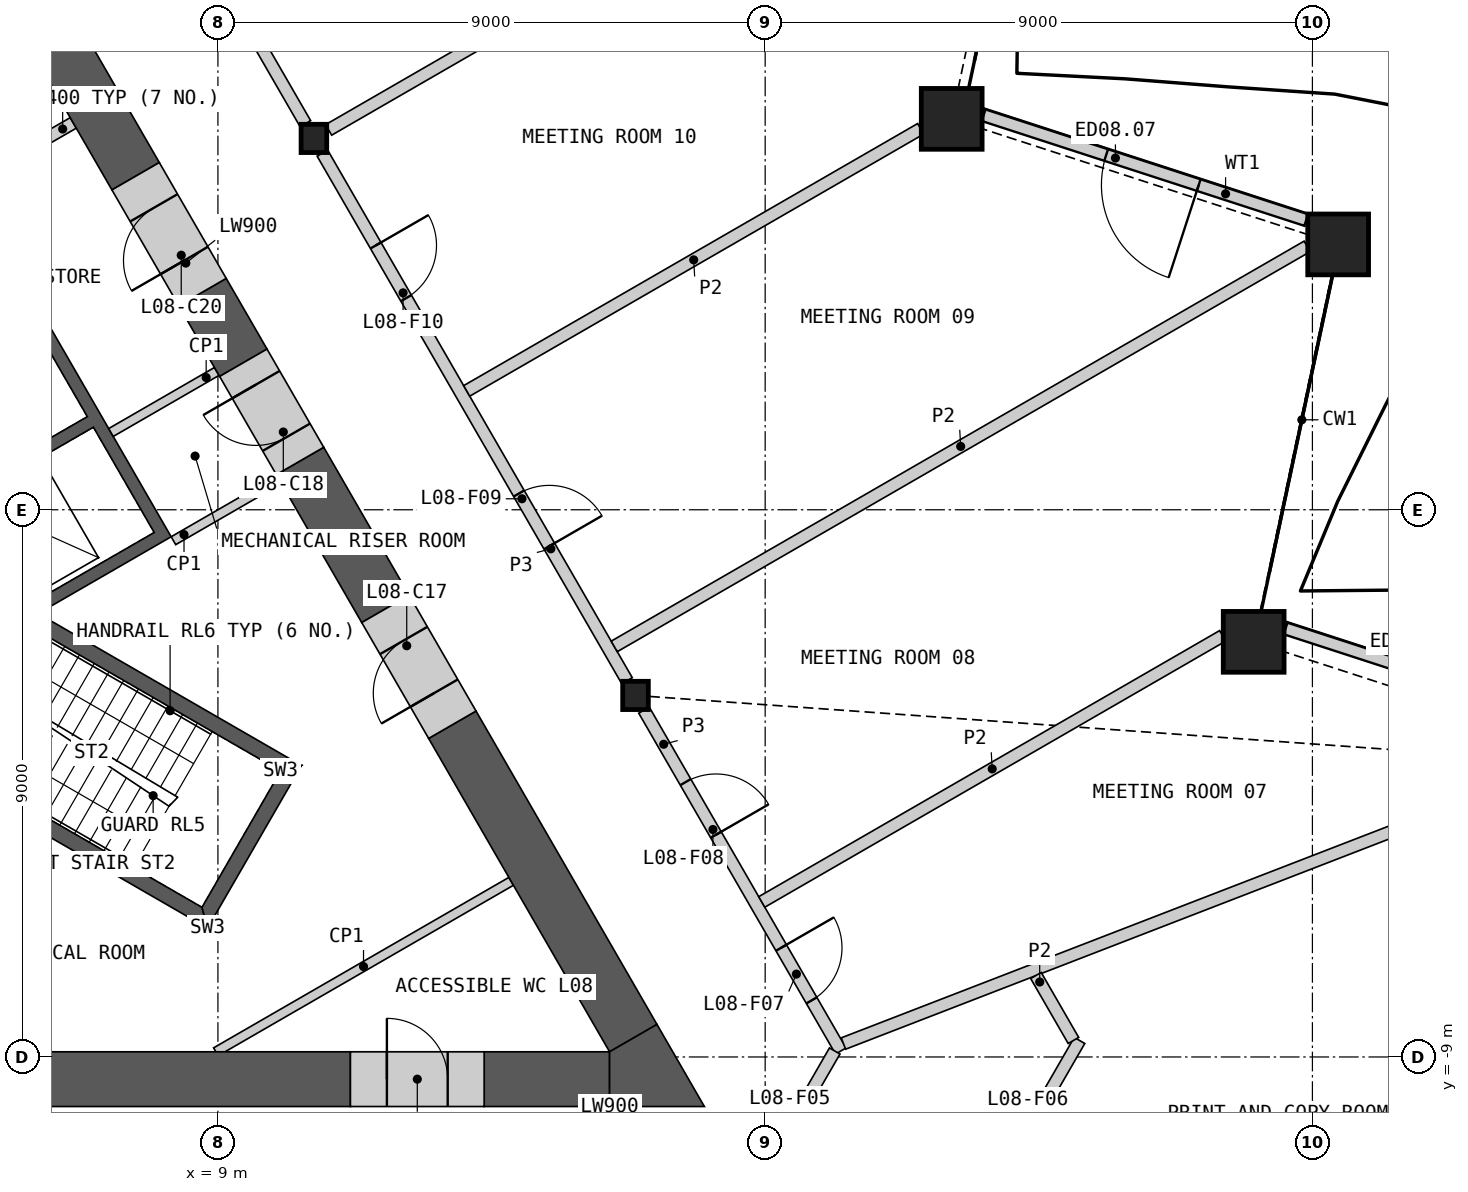
"""IFC4 building model, lengths in metres.
Left out: names, types, materials, properties, quantities, classifications, styles, units other than length and angle.
Written with IfcOpenShell. Run it as: python <this file> out.ifc"""

import sys

from ifc_helpers import new_model, si_unit, direction, frame, frame_2d, origin, origin_2d, place, context, subcontext, project, spatial, polyline, rectangle, hollow_rectangle, i_section, outline, extrude, element, fill, save


model = new_model("IFC4")
c1 = context("Model", 3, precision=1e-05, world=origin(), true_north=direction((0.0, 1.0)))
c2 = subcontext(c1, "Body", "Model", "MODEL_VIEW")
j1 = project(units=[si_unit("LENGTHUNIT", "METRE"), si_unit("PLANEANGLEUNIT", "RADIAN")], contexts=[c1])
p1 = place(None, origin())
s1 = spatial("IfcSite", under=j1, at=p1, CompositionType="ELEMENT")
p2 = place(p1, origin())
s2 = spatial("IfcBuilding", under=s1, at=p2, CompositionType="ELEMENT")
p3 = place(p2, frame((0.0, 0.0, 42.6)))
s3 = spatial("IfcBuildingStorey", under=s2, at=p3, CompositionType="ELEMENT", Elevation=42.6)
for number, where, z_axis, x_axis in (
    (1, (26.034, -2.172, 0.0), (0.0, 0.0, 1.0), (1.0, 0.0, 0.0)),
    (2, (27.423, 4.364, 0.0), (0.0, 0.0, 1.0), (1.0, 0.0, 0.0)),
    (3, (21.068, 6.429, 0.0), (0.0, 0.0, 1.0), (1.0, 0.0, 0.0)),
):
    element("IfcColumn", number, at=place(p3, frame(where, z_axis=z_axis, x_axis=x_axis)), inside=s3, PredefinedType="COLUMN", context=c2, shape_type="SweptSolid", body=[
        extrude(hollow_rectangle(XDim=1.0, YDim=1.0, WallThickness=0.07, at=origin_2d()), origin(), (0.0, 0.0, 1.0), 4.2),
    ])
for number, where, z_axis, x_axis in (
    (4, (15.868, -3.054, 0.0), (0.0, 0.0, 1.0), (1.0, 0.0, 0.0)),
    (5, (10.578, 6.107, 0.0), (0.0, 0.0, 1.0), (1.0, 0.0, 0.0)),
):
    element("IfcColumn", number, at=place(p3, frame(where, z_axis=z_axis, x_axis=x_axis)), inside=s3, PredefinedType="COLUMN", context=c2, shape_type="SweptSolid", body=[
        extrude(i_section(OverallWidth=0.421, OverallDepth=0.465, WebThickness=0.045, FlangeThickness=0.072, at=origin_2d()), origin(), (0.0, 0.0, 1.0), 4.2),
    ])
p4 = place(p3, frame((31.914, -3.693, 0.0), z_axis=(0.0, 0.0, 1.0), x_axis=(-0.951049360908, 0.309039015525, 0.0)))
e6 = element("IfcWall", 6, at=p4, inside=s3, PredefinedType="SOLIDWALL", context=c2, shape_type="SweptSolid", body=[
    extrude(rectangle(XDim=5.631, YDim=0.2, at=frame_2d((2.815, 0.0))), origin(), (0.0, 0.0, 1.0), 3.189),
])
p5 = place(p4, frame((2.031, 0.0, 0.0)))
e7 = element("IfcOpeningElement", 7, at=p5, cuts=e6, PredefinedType="OPENING", context=c2, shape_type="SweptSolid", body=[
    extrude(rectangle(XDim=1.6, YDim=2.4, at=frame_2d((0.8, 1.2))), frame((0.0, 0.11, 0.0), z_axis=(0.0, -1.0, 0.0), x_axis=(1.0, 0.0, 0.0)), (0.0, 0.0, 1.0), 0.22),
])
p6 = place(p3, frame((26.899, 4.765, 0.0), z_axis=(0.0, 0.0, 1.0), x_axis=(-0.951054004345, 0.309024725255, 0.0)))
e8 = element("IfcWall", 8, at=p6, inside=s3, PredefinedType="SOLIDWALL", context=c2, shape_type="SweptSolid", body=[
    extrude(rectangle(XDim=5.579, YDim=0.2, at=frame_2d((2.79, 0.0))), origin(), (0.0, 0.0, 1.0), 3.189),
])
p7 = place(p6, frame((1.86, 0.0, 0.0)))
e9 = element("IfcOpeningElement", 9, at=p7, cuts=e8, PredefinedType="OPENING", context=c2, shape_type="SweptSolid", body=[
    extrude(rectangle(XDim=1.6, YDim=2.4, at=frame_2d((0.8, 1.2))), frame((0.0, 0.11, 0.0), z_axis=(0.0, -1.0, 0.0), x_axis=(1.0, 0.0, 0.0)), (0.0, 0.0, 1.0), 0.22),
])
p8 = place(p3, origin())
e10 = element("IfcWall", 10, at=p8, inside=s3, PredefinedType="SHEAR", context=c2, shape_type="SweptSolid", body=[
    extrude(outline(polyline([(2.66, 4.192), (4.831, 5.445), (8.231, -0.444), (6.061, -1.697), (5.96, -1.524), (7.952, -0.374), (6.952, 1.358), (4.96, 0.208), (4.861, 0.381), (6.852, 1.531), (5.852, 3.263), (3.861, 2.113), (3.76, 2.287), (5.752, 3.437), (4.752, 5.169), (2.76, 4.019), (2.66, 4.192)])), origin(), (0.0, 0.0, 1.0), 3.8),
])
p9 = place(p3, frame((4.881, 5.358, 0.0), z_axis=(0.0, 0.0, 1.0), x_axis=(0.866035824272, 0.499981950752, 0.0)))
e11 = element("IfcWall", 11, at=p9, inside=s3, PredefinedType="SHEAR", context=c2, shape_type="SweptSolid", body=[
    extrude(rectangle(XDim=2.009, YDim=0.2, at=frame_2d((1.004, 0.0))), origin(), (0.0, 0.0, 1.0), 3.8),
])
p10 = place(p3, origin())
e12 = element("IfcWall", 12, at=p10, inside=s3, PredefinedType="SHEAR", context=c2, shape_type="SweptSolid", body=[
    extrude(outline(polyline([(3.763, -3.956), (8.83, -6.881), (8.738, -6.539), (3.888, -3.739), (3.763, -3.956)])), origin(), (0.0, 0.0, 1.0), 3.8),
])
p11 = place(p3, origin())
e13 = element("IfcWall", 13, at=p11, inside=s3, PredefinedType="SHEAR", context=c2, shape_type="SweptSolid", body=[
    extrude(outline(polyline([(8.83, -6.881), (10.374, -4.206), (10.032, -4.298), (8.738, -6.539), (8.83, -6.881)])), origin(), (0.0, 0.0, 1.0), 3.8),
])
p12 = place(p3, origin())
e14 = element("IfcWall", 14, at=p12, inside=s3, PredefinedType="SHEAR", context=c2, shape_type="SweptSolid", body=[
    extrude(outline(polyline([(10.032, -4.298), (10.374, -4.206), (5.307, -1.281), (5.182, -1.498), (10.032, -4.298)])), origin(), (0.0, 0.0, 1.0), 3.8),
])
p13 = place(p3, frame((8.268, -0.509, 0.0), z_axis=(0.0, 0.0, 1.0), x_axis=(0.866035824272, 0.499981950752, 0.0)))
e15 = element("IfcWall", 15, at=p13, inside=s3, PredefinedType="PARTITIONING", context=c2, shape_type="SweptSolid", body=[
    extrude(rectangle(XDim=2.009, YDim=0.15, at=frame_2d((1.004, 0.0))), origin(), (0.0, 0.0, 1.0), 3.8),
])
p14 = place(p3, frame((13.823, -6.111, 0.0), z_axis=(0.0, 0.0, 1.0), x_axis=(-0.866026802741, -0.499997576928, 0.0)))
e16 = element("IfcWall", 16, at=p14, inside=s3, PredefinedType="PARTITIONING", context=c2, shape_type="SweptSolid", body=[
    extrude(rectangle(XDim=5.607, YDim=0.15, at=frame_2d((2.804, 0.0))), origin(), (0.0, 0.0, 1.0), 3.8),
])
p15 = place(p3, frame((8.981, 2.275, 0.0), z_axis=(0.0, 0.0, 1.0), x_axis=(-0.866013584312, -0.500020471368, 0.0)))
e17 = element("IfcWall", 17, at=p15, inside=s3, PredefinedType="PARTITIONING", context=c2, shape_type="SweptSolid", body=[
    extrude(rectangle(XDim=2.009, YDim=0.15, at=frame_2d((1.005, 0.0))), origin(), (0.0, 0.0, 1.0), 3.8),
])
p16 = place(p3, frame((-4.371, -9.365, 0.0), z_axis=(0.0, 0.0, 1.0), x_axis=(1.0, 0.0, 0.0)))
e18 = element("IfcWall", 18, at=p16, inside=s3, PredefinedType="SHEAR", context=c2, shape_type="SweptSolid", body=[
    extrude(rectangle(XDim=15.55, YDim=0.9, at=frame_2d((7.775, 0.0))), origin(), (0.0, 0.0, 1.0), 3.8),
])
p17 = place(p3, frame((13.379, -9.365, 0.0), z_axis=(0.0, 0.0, 1.0), x_axis=(1.0, 0.0, 0.0)))
e19 = element("IfcWall", 19, at=p17, inside=s3, PredefinedType="SHEAR", context=c2, shape_type="SweptSolid", body=[
    extrude(rectangle(XDim=2.062, YDim=0.9, at=frame_2d((1.031, 0.0))), origin(), (0.0, 0.0, 1.0), 3.8),
])
p18 = place(p3, frame((15.831, -8.69, 0.0), z_axis=(0.0, 0.0, 1.0), x_axis=(-0.499999419053, 0.866025739194, 0.0)))
e20 = element("IfcWall", 20, at=p18, inside=s3, PredefinedType="SHEAR", context=c2, shape_type="SweptSolid", body=[
    extrude(rectangle(XDim=5.952, YDim=0.9, at=frame_2d((2.976, 0.0))), origin(), (0.0, 0.0, 1.0), 3.8),
])
p19 = place(p3, frame((7.646, 5.486, 0.0), z_axis=(0.0, 0.0, 1.0), x_axis=(-0.499978218965, 0.866037978706, 0.0)))
e21 = element("IfcWall", 21, at=p19, inside=s3, PredefinedType="SHEAR", context=c2, shape_type="SweptSolid", body=[
    extrude(rectangle(XDim=4.076, YDim=0.9, at=frame_2d((2.038, 0.0))), origin(), (0.0, 0.0, 1.0), 3.8),
])
p20 = place(p3, frame((11.755, -1.63, 0.0), z_axis=(0.0, 0.0, 1.0), x_axis=(-0.499943114462, 0.866058244174, 0.0)))
e22 = element("IfcWall", 22, at=p20, inside=s3, PredefinedType="SHEAR", context=c2, shape_type="SweptSolid", body=[
    extrude(rectangle(XDim=2.809, YDim=0.9, at=frame_2d((1.405, 0.0))), origin(), (0.0, 0.0, 1.0), 3.8),
])
p21 = place(p3, frame((9.418, 2.418, 0.0), z_axis=(0.0, 0.0, 1.0), x_axis=(-0.49995335277, 0.8660523339, 0.0)))
e23 = element("IfcWall", 23, at=p21, inside=s3, PredefinedType="SHEAR", context=c2, shape_type="SweptSolid", body=[
    extrude(rectangle(XDim=1.343, YDim=0.9, at=frame_2d((0.671, 0.0))), origin(), (0.0, 0.0, 1.0), 3.8),
])
p22 = place(p3, origin())
e24 = element("IfcWall", 24, at=p22, inside=s3, PredefinedType="SHEAR", context=c2, shape_type="SweptSolid", body=[
    extrude(outline(polyline([(15.441, -9.815), (15.441, -8.915), (16.221, -8.465), (17.0, -9.815), (15.441, -9.815)])), origin(), (0.0, 0.0, 1.0), 3.8),
])
p23 = place(p3, frame((11.179, -9.365, 0.0), z_axis=(0.0, 0.0, 1.0), x_axis=(1.0, 0.0, 0.0)))
e25 = element("IfcWall", 25, at=p23, inside=s3, PredefinedType="SHEAR", context=c2, shape_type="SweptSolid", body=[
    extrude(rectangle(XDim=2.2, YDim=0.9, at=frame_2d((1.1, 0.0))), origin(), (0.0, 0.0, 1.0), 3.8),
])
p24 = place(p23, frame((0.6, 0.0, 0.0)))
e26 = element("IfcOpeningElement", 26, at=p24, cuts=e25, PredefinedType="OPENING", context=c2, shape_type="SweptSolid", body=[
    extrude(rectangle(XDim=1.0, YDim=2.1, at=frame_2d((0.5, 1.05))), frame((0.0, 0.46, 0.0), z_axis=(0.0, -1.0, 0.0), x_axis=(1.0, 0.0, 0.0)), (0.0, 0.0, 1.0), 0.92),
])
p25 = place(p3, frame((12.855, -3.536, 0.0), z_axis=(0.0, 0.0, 1.0), x_axis=(-0.50002983664, 0.866008176907, 0.0)))
e27 = element("IfcWall", 27, at=p25, inside=s3, PredefinedType="SHEAR", context=c2, shape_type="SweptSolid", body=[
    extrude(rectangle(XDim=2.2, YDim=0.9, at=frame_2d((1.1, 0.0))), origin(), (0.0, 0.0, 1.0), 3.8),
])
p26 = place(p25, frame((0.6, 0.0, 0.0)))
e28 = element("IfcOpeningElement", 28, at=p26, cuts=e27, PredefinedType="OPENING", context=c2, shape_type="SweptSolid", body=[
    extrude(rectangle(XDim=1.0, YDim=2.1, at=frame_2d((0.5, 1.05))), frame((0.0, 0.46, 0.0), z_axis=(0.0, -1.0, 0.0), x_axis=(1.0, 0.0, 0.0)), (0.0, 0.0, 1.0), 0.92),
])
p27 = place(p3, frame((10.35, 0.803, 0.0), z_axis=(0.0, 0.0, 1.0), x_axis=(-0.500081290722, 0.865978465477, 0.0)))
e29 = element("IfcWall", 29, at=p27, inside=s3, PredefinedType="SHEAR", context=c2, shape_type="SweptSolid", body=[
    extrude(rectangle(XDim=1.865, YDim=0.9, at=frame_2d((0.933, 0.0))), origin(), (0.0, 0.0, 1.0), 3.8),
])
p28 = place(p27, frame((0.45, 0.0, 0.0)))
e30 = element("IfcOpeningElement", 30, at=p28, cuts=e29, PredefinedType="OPENING", context=c2, shape_type="SweptSolid", body=[
    extrude(rectangle(XDim=1.0, YDim=2.1, at=frame_2d((0.5, 1.05))), frame((0.0, 0.46, 0.0), z_axis=(0.0, -1.0, 0.0), x_axis=(1.0, 0.0, 0.0)), (0.0, 0.0, 1.0), 0.92),
])
p29 = place(p3, frame((8.747, 3.58, 0.0), z_axis=(0.0, 0.0, 1.0), x_axis=(-0.50002983664, 0.866008176907, 0.0)))
e31 = element("IfcWall", 31, at=p29, inside=s3, PredefinedType="SHEAR", context=c2, shape_type="SweptSolid", body=[
    extrude(rectangle(XDim=2.2, YDim=0.9, at=frame_2d((1.1, 0.0))), origin(), (0.0, 0.0, 1.0), 3.8),
])
p30 = place(p29, frame((0.6, 0.0, 0.0)))
e32 = element("IfcOpeningElement", 32, at=p30, cuts=e31, PredefinedType="OPENING", context=c2, shape_type="SweptSolid", body=[
    extrude(rectangle(XDim=1.0, YDim=2.1, at=frame_2d((0.5, 1.05))), frame((0.0, 0.46, 0.0), z_axis=(0.0, -1.0, 0.0), x_axis=(1.0, 0.0, 0.0)), (0.0, 0.0, 1.0), 0.92),
])
p31 = place(p3, frame((10.719, 5.865, 0.0), z_axis=(0.0, 0.0, 1.0), x_axis=(0.49999175339, -0.866030164915, 0.0)))
e33 = element("IfcWall", 33, at=p31, inside=s3, PredefinedType="PARTITIONING", context=c2, shape_type="SweptSolid", body=[
    extrude(rectangle(XDim=10.019, YDim=0.2, at=frame_2d((5.009, 0.0))), origin(), (0.0, 0.0, 1.0), 3.8),
])
p32 = place(p31, frame((6.464, 0.0, 0.0)))
e34 = element("IfcOpeningElement", 34, at=p32, cuts=e33, PredefinedType="OPENING", context=c2, shape_type="SweptSolid", body=[
    extrude(rectangle(XDim=1.0, YDim=2.1, at=frame_2d((0.5, 1.05))), frame((0.0, 0.11, 0.0), z_axis=(0.0, -1.0, 0.0), x_axis=(1.0, 0.0, 0.0)), (0.0, 0.0, 1.0), 0.22),
])
p33 = place(p31, frame((1.753, 0.0, 0.0)))
e35 = element("IfcOpeningElement", 35, at=p33, cuts=e33, PredefinedType="OPENING", context=c2, shape_type="SweptSolid", body=[
    extrude(rectangle(XDim=1.0, YDim=2.1, at=frame_2d((0.5, 1.05))), frame((0.0, 0.11, 0.0), z_axis=(0.0, -1.0, 0.0), x_axis=(1.0, 0.0, 0.0)), (0.0, 0.0, 1.0), 0.22),
])
p34 = place(p3, frame((5.429, 15.026, 0.0), z_axis=(0.0, 0.0, 1.0), x_axis=(0.50001002959, -0.86601961312, 0.0)))
e36 = element("IfcWall", 36, at=p34, inside=s3, PredefinedType="PARTITIONING", context=c2, shape_type="SweptSolid", body=[
    extrude(rectangle(XDim=10.019, YDim=0.2, at=frame_2d((5.009, 0.0))), origin(), (0.0, 0.0, 1.0), 3.8),
])
p35 = place(p34, frame((4.86, 0.0, 0.0)))
e37 = element("IfcOpeningElement", 37, at=p35, cuts=e36, PredefinedType="OPENING", context=c2, shape_type="SweptSolid", body=[
    extrude(rectangle(XDim=1.0, YDim=2.1, at=frame_2d((0.5, 1.05))), frame((0.0, 0.11, 0.0), z_axis=(0.0, -1.0, 0.0), x_axis=(1.0, 0.0, 0.0)), (0.0, 0.0, 1.0), 0.22),
])
p36 = place(p3, frame((16.008, -3.296, 0.0), z_axis=(0.0, 0.0, 1.0), x_axis=(0.499984737558, -0.86603421538, 0.0)))
e38 = element("IfcWall", 38, at=p36, inside=s3, PredefinedType="PARTITIONING", context=c2, shape_type="SweptSolid", body=[
    extrude(rectangle(XDim=6.473, YDim=0.2, at=frame_2d((3.236, 0.0))), origin(), (0.0, 0.0, 1.0), 3.8),
])
p37 = place(p36, frame((4.512, 0.0, 0.0)))
e39 = element("IfcOpeningElement", 39, at=p37, cuts=e38, PredefinedType="OPENING", context=c2, shape_type="SweptSolid", body=[
    extrude(rectangle(XDim=1.0, YDim=2.1, at=frame_2d((0.5, 1.05))), frame((0.0, 0.11, 0.0), z_axis=(0.0, -1.0, 0.0), x_axis=(1.0, 0.0, 0.0)), (0.0, 0.0, 1.0), 0.22),
])
p38 = place(p36, frame((1.366, 0.0, 0.0)))
e40 = element("IfcOpeningElement", 40, at=p38, cuts=e38, PredefinedType="OPENING", context=c2, shape_type="SweptSolid", body=[
    extrude(rectangle(XDim=1.0, YDim=2.1, at=frame_2d((0.5, 1.05))), frame((0.0, 0.11, 0.0), z_axis=(0.0, -1.0, 0.0), x_axis=(1.0, 0.0, 0.0)), (0.0, 0.0, 1.0), 0.22),
])
p39 = place(p3, frame((17.281, -12.128, 0.0), z_axis=(0.0, 0.0, 1.0), x_axis=(0.499958791762, 0.866049194065, 0.0)))
e41 = element("IfcWall", 41, at=p39, inside=s3, PredefinedType="PARTITIONING", context=c2, shape_type="SweptSolid", body=[
    extrude(rectangle(XDim=3.726, YDim=0.2, at=frame_2d((1.863, 0.0))), origin(), (0.0, 0.0, 1.0), 3.8),
])
p40 = place(p39, frame((1.388, 0.0, 0.0)))
e42 = element("IfcOpeningElement", 42, at=p40, cuts=e41, PredefinedType="OPENING", context=c2, shape_type="SweptSolid", body=[
    extrude(rectangle(XDim=0.95, YDim=2.1, at=frame_2d((0.475, 1.05))), frame((0.0, 0.11, 0.0), z_axis=(0.0, -1.0, 0.0), x_axis=(1.0, 0.0, 0.0)), (0.0, 0.0, 1.0), 0.22),
])
p41 = place(p3, frame((19.287, -8.779, 0.0), z_axis=(0.0, 0.0, 1.0), x_axis=(0.932669586354, 0.360731815467, 0.0)))
e43 = element("IfcWall", 43, at=p41, inside=s3, PredefinedType="PARTITIONING", context=c2, shape_type="SweptSolid", body=[
    extrude(rectangle(XDim=13.501, YDim=0.2, at=frame_2d((6.75, 0.0))), origin(), (0.0, 0.0, 1.0), 2.885),
])
p42 = place(p3, frame((15.518, -2.248, 0.0), z_axis=(0.0, 0.0, 1.0), x_axis=(0.866025231175, 0.500000298968, 0.0)))
e44 = element("IfcWall", 44, at=p42, inside=s3, PredefinedType="PARTITIONING", context=c2, shape_type="SweptSolid", body=[
    extrude(rectangle(XDim=13.159, YDim=0.2, at=frame_2d((6.579, 0.0))), origin(), (0.0, 0.0, 1.0), 2.885),
])
p43 = place(p3, frame((10.821, 6.247, 0.0), z_axis=(0.0, 0.0, 1.0), x_axis=(0.866026729935, 0.499997703033, 0.0)))
e45 = element("IfcWall", 45, at=p43, inside=s3, PredefinedType="PARTITIONING", context=c2, shape_type="SweptSolid", body=[
    extrude(rectangle(XDim=12.848, YDim=0.2, at=frame_2d((6.424, 0.0))), origin(), (0.0, 0.0, 1.0), 2.885),
])
p44 = place(p3, frame((17.944, -6.45, 0.0), z_axis=(0.0, 0.0, 1.0), x_axis=(0.866025328989, 0.50000012955, 0.0)))
e46 = element("IfcWall", 46, at=p44, inside=s3, PredefinedType="PARTITIONING", context=c2, shape_type="SweptSolid", body=[
    extrude(rectangle(XDim=8.752, YDim=0.2, at=frame_2d((4.376, 0.0))), origin(), (0.0, 0.0, 1.0), 2.885),
])
p45 = place(p3, frame((13.091, 1.955, 0.0), z_axis=(0.0, 0.0, 1.0), x_axis=(0.866026670206, 0.499997806488, 0.0)))
e47 = element("IfcWall", 47, at=p45, inside=s3, PredefinedType="PARTITIONING", context=c2, shape_type="SweptSolid", body=[
    extrude(rectangle(XDim=8.622, YDim=0.2, at=frame_2d((4.311, 0.0))), origin(), (0.0, 0.0, 1.0), 2.885),
])
p46 = place(p3, frame((21.297, -11.973, 0.0), z_axis=(0.0, 0.0, 1.0), x_axis=(0.500008291124, 0.866020616849, 0.0)))
e48 = element("IfcWall", 48, at=p46, inside=s3, PredefinedType="PARTITIONING", context=c2, shape_type="SweptSolid", body=[
    extrude(rectangle(XDim=3.746, YDim=0.2, at=frame_2d((1.873, 0.0))), origin(), (0.0, 0.0, 1.0), 2.885),
])
p47 = place(p46, frame((1.189, 0.0, 0.0)))
e49 = element("IfcOpeningElement", 49, at=p47, cuts=e48, PredefinedType="OPENING", context=c2, shape_type="SweptSolid", body=[
    extrude(rectangle(XDim=0.95, YDim=2.1, at=frame_2d((0.475, 1.05))), frame((0.0, 0.11, 0.0), z_axis=(0.0, -1.0, 0.0), x_axis=(1.0, 0.0, 0.0)), (0.0, 0.0, 1.0), 0.22),
])
p48 = place(p3, frame((22.453, -7.66, 0.0), z_axis=(0.0, 0.0, 1.0), x_axis=(0.499928040405, -0.86606694569, 0.0)))
e50 = element("IfcWall", 50, at=p48, inside=s3, PredefinedType="PARTITIONING", context=c2, shape_type="SweptSolid", body=[
    extrude(rectangle(XDim=1.234, YDim=0.2, at=frame_2d((0.617, 0.0))), origin(), (0.0, 0.0, 1.0), 2.885),
])
p49 = place(p7, origin())
e51 = element("IfcDoor", 51, at=p49, inside=s3, OperationType="DOUBLE_DOOR_SINGLE_SWING", PredefinedType="DOOR", context=c2, shape_type="SweptSolid", body=[
    extrude(rectangle(XDim=1.6, YDim=2.4, at=frame_2d((0.8, 1.2))), frame((0.0, 0.025, 0.0), z_axis=(0.0, -1.0, 0.0), x_axis=(1.0, 0.0, 0.0)), (0.0, 0.0, 1.0), 0.05),
])
fill(e9, e51)
p50 = place(p24, origin())
e52 = element("IfcDoor", 52, at=p50, inside=s3, OperationType="SINGLE_SWING_LEFT", PredefinedType="DOOR", context=c2, shape_type="SweptSolid", body=[
    extrude(rectangle(XDim=1.0, YDim=2.1, at=frame_2d((0.5, 1.05))), frame((0.0, 0.205, 0.0), z_axis=(0.0, -1.0, 0.0), x_axis=(1.0, 0.0, 0.0)), (0.0, 0.0, 1.0), 0.05),
])
fill(e26, e52)
p51 = place(p26, origin())
e53 = element("IfcDoor", 53, at=p51, inside=s3, OperationType="SINGLE_SWING_LEFT", PredefinedType="DOOR", context=c2, shape_type="SweptSolid", body=[
    extrude(rectangle(XDim=1.0, YDim=2.1, at=frame_2d((0.5, 1.05))), frame((0.0, 0.205, 0.0), z_axis=(0.0, -1.0, 0.0), x_axis=(1.0, 0.0, 0.0)), (0.0, 0.0, 1.0), 0.05),
])
fill(e28, e53)
p52 = place(p28, origin())
e54 = element("IfcDoor", 54, at=p52, inside=s3, OperationType="SINGLE_SWING_RIGHT", PredefinedType="DOOR", context=c2, shape_type="SweptSolid", body=[
    extrude(rectangle(XDim=1.0, YDim=2.1, at=frame_2d((0.5, 1.05))), frame((0.0, 0.205, 0.0), z_axis=(0.0, -1.0, 0.0), x_axis=(1.0, 0.0, 0.0)), (0.0, 0.0, 1.0), 0.05),
])
fill(e30, e54)
p53 = place(p30, origin())
e55 = element("IfcDoor", 55, at=p53, inside=s3, OperationType="SINGLE_SWING_LEFT", PredefinedType="DOOR", context=c2, shape_type="SweptSolid", body=[
    extrude(rectangle(XDim=1.0, YDim=2.1, at=frame_2d((0.5, 1.05))), frame((0.0, 0.205, 0.0), z_axis=(0.0, -1.0, 0.0), x_axis=(1.0, 0.0, 0.0)), (0.0, 0.0, 1.0), 0.05),
])
fill(e32, e55)
p54 = place(p37, origin())
e56 = element("IfcDoor", 56, at=p54, inside=s3, OperationType="SINGLE_SWING_LEFT", PredefinedType="DOOR", context=c2, shape_type="SweptSolid", body=[
    extrude(rectangle(XDim=1.0, YDim=2.1, at=frame_2d((0.5, 1.05))), frame((0.0, 0.025, 0.0), z_axis=(0.0, -1.0, 0.0), x_axis=(1.0, 0.0, 0.0)), (0.0, 0.0, 1.0), 0.05),
])
fill(e39, e56)
p55 = place(p38, origin())
e57 = element("IfcDoor", 57, at=p55, inside=s3, OperationType="SINGLE_SWING_RIGHT", PredefinedType="DOOR", context=c2, shape_type="SweptSolid", body=[
    extrude(rectangle(XDim=1.0, YDim=2.1, at=frame_2d((0.5, 1.05))), frame((0.0, 0.025, 0.0), z_axis=(0.0, -1.0, 0.0), x_axis=(1.0, 0.0, 0.0)), (0.0, 0.0, 1.0), 0.05),
])
fill(e40, e57)
p56 = place(p32, origin())
e58 = element("IfcDoor", 58, at=p56, inside=s3, OperationType="SINGLE_SWING_RIGHT", PredefinedType="DOOR", context=c2, shape_type="SweptSolid", body=[
    extrude(rectangle(XDim=1.0, YDim=2.1, at=frame_2d((0.5, 1.05))), frame((0.0, 0.025, 0.0), z_axis=(0.0, -1.0, 0.0), x_axis=(1.0, 0.0, 0.0)), (0.0, 0.0, 1.0), 0.05),
])
fill(e34, e58)
p57 = place(p33, origin())
e59 = element("IfcDoor", 59, at=p57, inside=s3, OperationType="SINGLE_SWING_LEFT", PredefinedType="DOOR", context=c2, shape_type="SweptSolid", body=[
    extrude(rectangle(XDim=1.0, YDim=2.1, at=frame_2d((0.5, 1.05))), frame((0.0, 0.025, 0.0), z_axis=(0.0, -1.0, 0.0), x_axis=(1.0, 0.0, 0.0)), (0.0, 0.0, 1.0), 0.05),
])
fill(e35, e59)
save(model, sys.argv[1])
